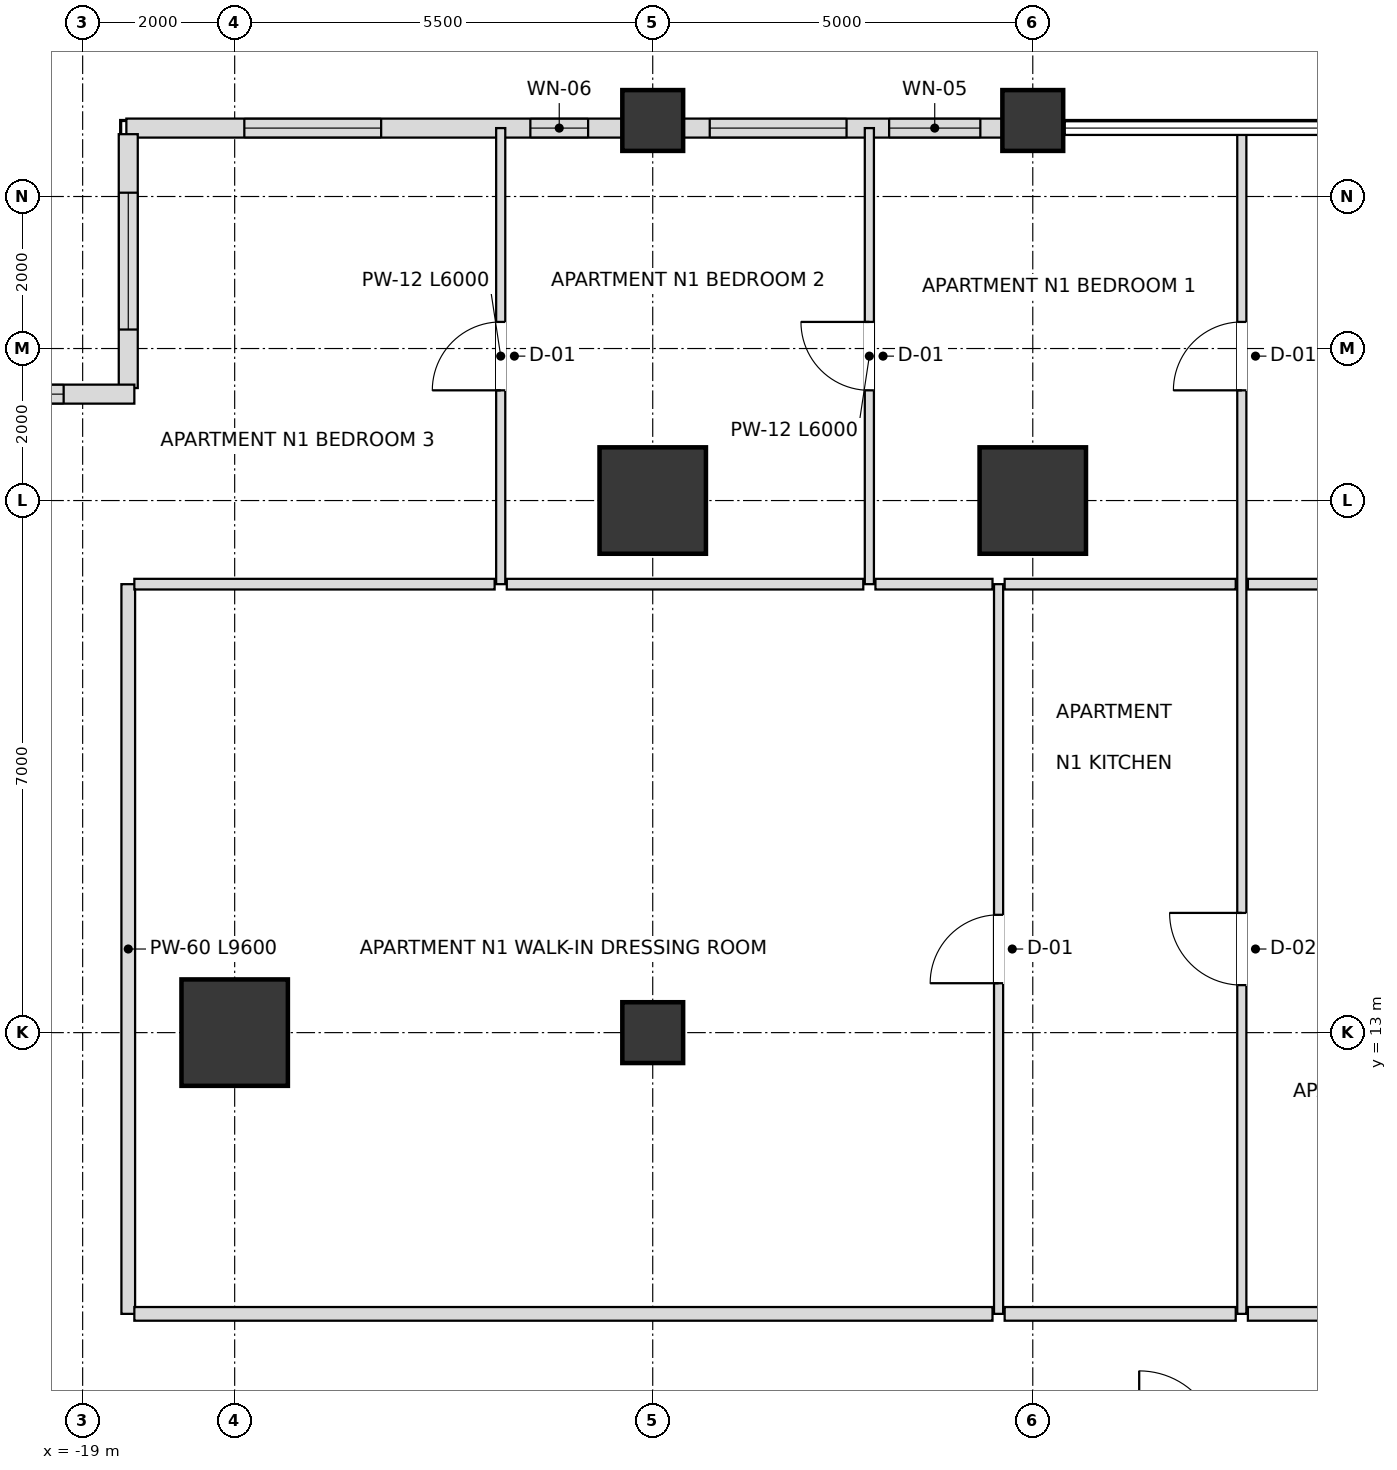
"""IFC4 building model, lengths in metres.
Left out: names, types, materials, properties, quantities, classifications, styles, units other than length and angle.
Written with IfcOpenShell. Run it as: python <this file> out.ifc"""

import sys

from ifc_helpers import new_model, si_unit, direction, frame, frame_2d, origin, origin_2d, place, context, subcontext, project, spatial, rectangle, extrude, element, fill, save


model = new_model("IFC4")
c1 = context("Model", 3, precision=1e-05, world=origin(), true_north=direction((0.0, 1.0)))
c2 = subcontext(c1, "Body", "Model", "MODEL_VIEW")
j1 = project(units=[si_unit("LENGTHUNIT", "METRE"), si_unit("PLANEANGLEUNIT", "RADIAN")], contexts=[c1])
p1 = place(None, origin())
s1 = spatial("IfcSite", under=j1, at=p1, CompositionType="ELEMENT")
p2 = place(p1, origin())
s2 = spatial("IfcBuilding", under=s1, at=p2, CompositionType="ELEMENT")
p3 = place(p2, frame((0.0, 0.0, 64.8)))
s3 = spatial("IfcBuildingStorey", under=s2, at=p3, CompositionType="ELEMENT", Elevation=64.8)
for number, where, z_axis, x_axis in (
    (1, (-6.5, 20.0, 0.0), (0.0, 0.0, 1.0), (1.0, 0.0, 0.0)),
    (2, (-11.5, 20.0, 0.0), (0.0, 0.0, 1.0), (1.0, 0.0, 0.0)),
    (3, (-17.0, 13.0, 0.0), (0.0, 0.0, 1.0), (1.0, 0.0, 0.0)),
):
    element("IfcColumn", number, at=place(p3, frame(where, z_axis=z_axis, x_axis=x_axis)), inside=s3, PredefinedType="USERDEFINED", context=c2, shape_type="SweptSolid", body=[
        extrude(rectangle(XDim=1.4, YDim=1.4, at=origin_2d()), origin(), (0.0, 0.0, 1.0), 3.6),
    ])
for number, where, z_axis, x_axis in (
    (4, (-11.5, 13.0, 0.0), (0.0, 0.0, 1.0), (1.0, 0.0, 0.0)),
    (5, (-11.5, 25.0, 0.0), (0.0, 0.0, 1.0), (1.0, 0.0, 0.0)),
    (6, (-6.5, 25.0, 0.0), (0.0, 0.0, 1.0), (1.0, 0.0, 0.0)),
):
    element("IfcColumn", number, at=place(p3, frame(where, z_axis=z_axis, x_axis=x_axis)), inside=s3, PredefinedType="COLUMN", context=c2, shape_type="SweptSolid", body=[
        extrude(rectangle(XDim=0.8, YDim=0.8, at=origin_2d()), origin(), (0.0, 0.0, 1.0), 3.6),
    ])
p4 = place(p3, frame((-6.895, 24.9, 0.0), z_axis=(0.0, 0.0, 1.0), x_axis=(-1.0, 0.0, 0.0)))
e7 = element("IfcWall", 7, at=p4, inside=s3, PredefinedType="SOLIDWALL", context=c2, shape_type="SweptSolid", body=[
    extrude(rectangle(XDim=4.21, YDim=0.25, at=frame_2d((2.105, 0.0))), origin(), (0.0, 0.0, 1.0), 2.736),
])
p5 = place(p4, frame((0.295, 0.0, 0.72)))
e8 = element("IfcOpeningElement", 8, at=p5, cuts=e7, PredefinedType="OPENING", context=c2, shape_type="SweptSolid", body=[
    extrude(rectangle(XDim=1.2, YDim=1.68, at=frame_2d((0.6, 0.84))), frame((0.0, 0.135, 0.0), z_axis=(0.0, -1.0, 0.0), x_axis=(1.0, 0.0, 0.0)), (0.0, 0.0, 1.0), 0.27),
])
p6 = place(p4, frame((2.055, 0.0, 0.72)))
e9 = element("IfcOpeningElement", 9, at=p6, cuts=e7, PredefinedType="OPENING", context=c2, shape_type="SweptSolid", body=[
    extrude(rectangle(XDim=1.8, YDim=1.68, at=frame_2d((0.9, 0.84))), frame((0.0, 0.135, 0.0), z_axis=(0.0, -1.0, 0.0), x_axis=(1.0, 0.0, 0.0)), (0.0, 0.0, 1.0), 0.27),
])
p7 = place(p3, frame((-11.895, 24.9, 0.0), z_axis=(0.0, 0.0, 1.0), x_axis=(-1.0, 0.0, 0.0)))
e10 = element("IfcWall", 10, at=p7, inside=s3, PredefinedType="SOLIDWALL", context=c2, shape_type="SweptSolid", body=[
    extrude(rectangle(XDim=6.53, YDim=0.25, at=frame_2d((3.265, 0.0))), origin(), (0.0, 0.0, 1.0), 2.736),
])
p8 = place(p7, frame((0.455, 0.0, 0.72)))
e11 = element("IfcOpeningElement", 11, at=p8, cuts=e10, PredefinedType="OPENING", context=c2, shape_type="SweptSolid", body=[
    extrude(rectangle(XDim=0.76, YDim=1.68, at=frame_2d((0.38, 0.84))), frame((0.0, 0.135, 0.0), z_axis=(0.0, -1.0, 0.0), x_axis=(1.0, 0.0, 0.0)), (0.0, 0.0, 1.0), 0.27),
])
p9 = place(p7, frame((3.178, 0.0, 0.72)))
e12 = element("IfcOpeningElement", 12, at=p9, cuts=e10, PredefinedType="OPENING", context=c2, shape_type="SweptSolid", body=[
    extrude(rectangle(XDim=1.8, YDim=1.68, at=frame_2d((0.9, 0.84))), frame((0.0, 0.135, 0.0), z_axis=(0.0, -1.0, 0.0), x_axis=(1.0, 0.0, 0.0)), (0.0, 0.0, 1.0), 0.27),
])
p10 = place(p3, frame((-18.4, 24.82, 0.0), z_axis=(0.0, 0.0, 1.0), x_axis=(0.0, -1.0, 0.0)))
e13 = element("IfcWall", 13, at=p10, inside=s3, PredefinedType="SOLIDWALL", context=c2, shape_type="SweptSolid", body=[
    extrude(rectangle(XDim=3.34, YDim=0.25, at=frame_2d((1.67, 0.0))), origin(), (0.0, 0.0, 1.0), 2.736),
])
p11 = place(p10, frame((0.77, 0.0, 0.72)))
e14 = element("IfcOpeningElement", 14, at=p11, cuts=e13, PredefinedType="OPENING", context=c2, shape_type="SweptSolid", body=[
    extrude(rectangle(XDim=1.8, YDim=1.68, at=frame_2d((0.9, 0.84))), frame((0.0, 0.135, 0.0), z_axis=(0.0, -1.0, 0.0), x_axis=(1.0, 0.0, 0.0)), (0.0, 0.0, 1.0), 0.27),
])
p12 = place(p3, frame((-18.32, 21.4, 0.0), z_axis=(0.0, 0.0, 1.0), x_axis=(-1.0, 0.0, 0.0)))
e15 = element("IfcWall", 15, at=p12, inside=s3, PredefinedType="SOLIDWALL", context=c2, shape_type="SweptSolid", body=[
    extrude(rectangle(XDim=3.66, YDim=0.25, at=frame_2d((1.83, 0.0))), origin(), (0.0, 0.0, 1.0), 2.736),
])
p13 = place(p12, frame((0.93, 0.0, 0.72)))
e16 = element("IfcOpeningElement", 16, at=p13, cuts=e15, PredefinedType="OPENING", context=c2, shape_type="SweptSolid", body=[
    extrude(rectangle(XDim=1.8, YDim=1.68, at=frame_2d((0.9, 0.84))), frame((0.0, 0.135, 0.0), z_axis=(0.0, -1.0, 0.0), x_axis=(1.0, 0.0, 0.0)), (0.0, 0.0, 1.0), 0.27),
])
p14 = place(p3, frame((-18.4, 9.3, 0.0), z_axis=(0.0, 0.0, 1.0), x_axis=(0.0, 1.0, 0.0)))
e17 = element("IfcWall", 17, at=p14, inside=s3, PredefinedType="PARTITIONING", context=c2, shape_type="SweptSolid", body=[
    extrude(rectangle(XDim=9.6, YDim=0.18, at=frame_2d((4.8, 0.0))), origin(), (0.0, 0.0, 1.0), 2.736),
])
p15 = place(p3, frame((-13.5, 18.9, 0.0), z_axis=(0.0, 0.0, 1.0), x_axis=(0.0, 1.0, 0.0)))
e18 = element("IfcWall", 18, at=p15, inside=s3, PredefinedType="PARTITIONING", context=c2, shape_type="SweptSolid", body=[
    extrude(rectangle(XDim=6.0, YDim=0.12, at=frame_2d((3.0, 0.0))), origin(), (0.0, 0.0, 1.0), 2.736),
])
p16 = place(p15, frame((2.55, 0.0, 0.0)))
e19 = element("IfcOpeningElement", 19, at=p16, cuts=e18, PredefinedType="OPENING", context=c2, shape_type="SweptSolid", body=[
    extrude(rectangle(XDim=0.9, YDim=2.1, at=frame_2d((0.45, 1.05))), frame((0.0, 0.07, 0.0), z_axis=(0.0, -1.0, 0.0), x_axis=(1.0, 0.0, 0.0)), (0.0, 0.0, 1.0), 0.14),
])
p17 = place(p3, frame((-8.65, 18.9, 0.0), z_axis=(0.0, 0.0, 1.0), x_axis=(0.0, 1.0, 0.0)))
e20 = element("IfcWall", 20, at=p17, inside=s3, PredefinedType="PARTITIONING", context=c2, shape_type="SweptSolid", body=[
    extrude(rectangle(XDim=6.0, YDim=0.12, at=frame_2d((3.0, 0.0))), origin(), (0.0, 0.0, 1.0), 2.816),
])
p18 = place(p17, frame((2.55, 0.0, 0.0)))
e21 = element("IfcOpeningElement", 21, at=p18, cuts=e20, PredefinedType="OPENING", context=c2, shape_type="SweptSolid", body=[
    extrude(rectangle(XDim=0.9, YDim=2.1, at=frame_2d((0.45, 1.05))), frame((0.0, 0.07, 0.0), z_axis=(0.0, -1.0, 0.0), x_axis=(1.0, 0.0, 0.0)), (0.0, 0.0, 1.0), 0.14),
])
p19 = place(p3, frame((-6.95, 9.3, 0.0), z_axis=(0.0, 0.0, 1.0), x_axis=(0.0, 1.0, 0.0)))
e22 = element("IfcWall", 22, at=p19, inside=s3, PredefinedType="PARTITIONING", context=c2, shape_type="SweptSolid", body=[
    extrude(rectangle(XDim=9.6, YDim=0.12, at=frame_2d((4.8, 0.0))), origin(), (0.0, 0.0, 1.0), 2.816),
])
p20 = place(p19, frame((4.35, 0.0, 0.0)))
e23 = element("IfcOpeningElement", 23, at=p20, cuts=e22, PredefinedType="OPENING", context=c2, shape_type="SweptSolid", body=[
    extrude(rectangle(XDim=0.9, YDim=2.1, at=frame_2d((0.45, 1.05))), frame((0.0, 0.07, 0.0), z_axis=(0.0, -1.0, 0.0), x_axis=(1.0, 0.0, 0.0)), (0.0, 0.0, 1.0), 0.14),
])
p21 = place(p3, frame((-3.75, 9.3, 0.0), z_axis=(0.0, 0.0, 1.0), x_axis=(0.0, 1.0, 0.0)))
e24 = element("IfcWall", 24, at=p21, inside=s3, PredefinedType="PARTITIONING", context=c2, shape_type="SweptSolid", body=[
    extrude(rectangle(XDim=15.6, YDim=0.12, at=frame_2d((7.8, 0.0))), origin(), (0.0, 0.0, 1.0), 2.816),
])
p22 = place(p21, frame((4.325, 0.0, 0.0)))
e25 = element("IfcOpeningElement", 25, at=p22, cuts=e24, PredefinedType="OPENING", context=c2, shape_type="SweptSolid", body=[
    extrude(rectangle(XDim=0.95, YDim=2.1, at=frame_2d((0.475, 1.05))), frame((0.0, 0.07, 0.0), z_axis=(0.0, -1.0, 0.0), x_axis=(1.0, 0.0, 0.0)), (0.0, 0.0, 1.0), 0.14),
])
p23 = place(p21, frame((12.15, 0.0, 0.0)))
e26 = element("IfcOpeningElement", 26, at=p23, cuts=e24, PredefinedType="OPENING", context=c2, shape_type="SweptSolid", body=[
    extrude(rectangle(XDim=0.9, YDim=2.1, at=frame_2d((0.45, 1.05))), frame((0.0, 0.07, 0.0), z_axis=(0.0, -1.0, 0.0), x_axis=(1.0, 0.0, 0.0)), (0.0, 0.0, 1.0), 0.14),
])
p24 = place(p3, frame((-18.32, 9.3, 0.0), z_axis=(0.0, 0.0, 1.0), x_axis=(1.0, 0.0, 0.0)))
e27 = element("IfcWall", 27, at=p24, inside=s3, PredefinedType="PARTITIONING", context=c2, shape_type="SweptSolid", body=[
    extrude(rectangle(XDim=11.29, YDim=0.18, at=frame_2d((5.645, 0.0))), origin(), (0.0, 0.0, 1.0), 2.816),
])
p25 = place(p3, frame((-6.87, 9.3, 0.0), z_axis=(0.0, 0.0, 1.0), x_axis=(1.0, 0.0, 0.0)))
e28 = element("IfcWall", 28, at=p25, inside=s3, PredefinedType="PARTITIONING", context=c2, shape_type="SweptSolid", body=[
    extrude(rectangle(XDim=3.04, YDim=0.18, at=frame_2d((1.52, 0.0))), origin(), (0.0, 0.0, 1.0), 2.816),
])
p26 = place(p3, frame((-3.67, 9.3, 0.0), z_axis=(0.0, 0.0, 1.0), x_axis=(1.0, 0.0, 0.0)))
e29 = element("IfcWall", 29, at=p26, inside=s3, PredefinedType="PARTITIONING", context=c2, shape_type="SweptSolid", body=[
    extrude(rectangle(XDim=4.04, YDim=0.18, at=frame_2d((2.02, 0.0))), origin(), (0.0, 0.0, 1.0), 3.38),
])
p27 = place(p26, frame((1.535, 0.0, 0.0)))
e30 = element("IfcOpeningElement", 30, at=p27, cuts=e29, PredefinedType="OPENING", context=c2, shape_type="SweptSolid", body=[
    extrude(rectangle(XDim=0.95, YDim=2.15, at=frame_2d((0.475, 1.075))), frame((0.0, 0.1, 0.0), z_axis=(0.0, -1.0, 0.0), x_axis=(1.0, 0.0, 0.0)), (0.0, 0.0, 1.0), 0.2),
])
p28 = place(p3, frame((-18.32, 18.9, 0.0), z_axis=(0.0, 0.0, 1.0), x_axis=(1.0, 0.0, 0.0)))
e31 = element("IfcWall", 31, at=p28, inside=s3, PredefinedType="PARTITIONING", context=c2, shape_type="SweptSolid", body=[
    extrude(rectangle(XDim=4.74, YDim=0.14, at=frame_2d((2.37, 0.0))), origin(), (0.0, 0.0, 1.0), 2.736),
])
p29 = place(p3, frame((-13.42, 18.9, 0.0), z_axis=(0.0, 0.0, 1.0), x_axis=(1.0, 0.0, 0.0)))
e32 = element("IfcWall", 32, at=p29, inside=s3, PredefinedType="PARTITIONING", context=c2, shape_type="SweptSolid", body=[
    extrude(rectangle(XDim=4.69, YDim=0.14, at=frame_2d((2.345, 0.0))), origin(), (0.0, 0.0, 1.0), 2.736),
])
p30 = place(p3, frame((-8.57, 18.9, 0.0), z_axis=(0.0, 0.0, 1.0), x_axis=(1.0, 0.0, 0.0)))
e33 = element("IfcWall", 33, at=p30, inside=s3, PredefinedType="PARTITIONING", context=c2, shape_type="SweptSolid", body=[
    extrude(rectangle(XDim=1.54, YDim=0.14, at=frame_2d((0.77, 0.0))), origin(), (0.0, 0.0, 1.0), 3.38),
])
p31 = place(p3, frame((-6.87, 18.9, 0.0), z_axis=(0.0, 0.0, 1.0), x_axis=(1.0, 0.0, 0.0)))
e34 = element("IfcWall", 34, at=p31, inside=s3, PredefinedType="PARTITIONING", context=c2, shape_type="SweptSolid", body=[
    extrude(rectangle(XDim=3.04, YDim=0.14, at=frame_2d((1.52, 0.0))), origin(), (0.0, 0.0, 1.0), 2.816),
])
p32 = place(p3, frame((-3.67, 18.9, 0.0), z_axis=(0.0, 0.0, 1.0), x_axis=(1.0, 0.0, 0.0)))
e35 = element("IfcWall", 35, at=p32, inside=s3, PredefinedType="PARTITIONING", context=c2, shape_type="SweptSolid", body=[
    extrude(rectangle(XDim=4.04, YDim=0.14, at=frame_2d((2.02, 0.0))), origin(), (0.0, 0.0, 1.0), 3.38),
])
p33 = place(p32, frame((1.535, 0.0, 0.0)))
e36 = element("IfcOpeningElement", 36, at=p33, cuts=e35, PredefinedType="OPENING", context=c2, shape_type="SweptSolid", body=[
    extrude(rectangle(XDim=0.95, YDim=2.1, at=frame_2d((0.475, 1.05))), frame((0.0, 0.08, 0.0), z_axis=(0.0, -1.0, 0.0), x_axis=(1.0, 0.0, 0.0)), (0.0, 0.0, 1.0), 0.16),
])
p34 = place(p5, origin())
e37 = element("IfcWindow", 37, at=p34, inside=s3, PartitioningType="SINGLE_PANEL", PredefinedType="WINDOW", context=c2, shape_type="SweptSolid", body=[
    extrude(rectangle(XDim=1.2, YDim=1.68, at=frame_2d((0.6, 0.84))), frame((0.0, 0.03, 0.0), z_axis=(0.0, -1.0, 0.0), x_axis=(1.0, 0.0, 0.0)), (0.0, 0.0, 1.0), 0.06),
])
fill(e8, e37)
p35 = place(p6, origin())
e38 = element("IfcWindow", 38, at=p35, inside=s3, PartitioningType="SINGLE_PANEL", PredefinedType="WINDOW", context=c2, shape_type="SweptSolid", body=[
    extrude(rectangle(XDim=1.8, YDim=1.68, at=frame_2d((0.9, 0.84))), frame((0.0, 0.03, 0.0), z_axis=(0.0, -1.0, 0.0), x_axis=(1.0, 0.0, 0.0)), (0.0, 0.0, 1.0), 0.06),
])
fill(e9, e38)
p36 = place(p8, origin())
e39 = element("IfcWindow", 39, at=p36, inside=s3, PartitioningType="SINGLE_PANEL", PredefinedType="WINDOW", context=c2, shape_type="SweptSolid", body=[
    extrude(rectangle(XDim=0.76, YDim=1.68, at=frame_2d((0.38, 0.84))), frame((0.0, 0.03, 0.0), z_axis=(0.0, -1.0, 0.0), x_axis=(1.0, 0.0, 0.0)), (0.0, 0.0, 1.0), 0.06),
])
fill(e11, e39)
p37 = place(p9, origin())
e40 = element("IfcWindow", 40, at=p37, inside=s3, PartitioningType="SINGLE_PANEL", PredefinedType="WINDOW", context=c2, shape_type="SweptSolid", body=[
    extrude(rectangle(XDim=1.8, YDim=1.68, at=frame_2d((0.9, 0.84))), frame((0.0, 0.03, 0.0), z_axis=(0.0, -1.0, 0.0), x_axis=(1.0, 0.0, 0.0)), (0.0, 0.0, 1.0), 0.06),
])
fill(e12, e40)
p38 = place(p11, origin())
e41 = element("IfcWindow", 41, at=p38, inside=s3, PartitioningType="SINGLE_PANEL", PredefinedType="WINDOW", context=c2, shape_type="SweptSolid", body=[
    extrude(rectangle(XDim=1.8, YDim=1.68, at=frame_2d((0.9, 0.84))), frame((0.0, 0.03, 0.0), z_axis=(0.0, -1.0, 0.0), x_axis=(1.0, 0.0, 0.0)), (0.0, 0.0, 1.0), 0.06),
])
fill(e14, e41)
p39 = place(p13, origin())
e42 = element("IfcWindow", 42, at=p39, inside=s3, PartitioningType="SINGLE_PANEL", PredefinedType="WINDOW", context=c2, shape_type="SweptSolid", body=[
    extrude(rectangle(XDim=1.8, YDim=1.68, at=frame_2d((0.9, 0.84))), frame((0.0, 0.03, 0.0), z_axis=(0.0, -1.0, 0.0), x_axis=(1.0, 0.0, 0.0)), (0.0, 0.0, 1.0), 0.06),
])
fill(e16, e42)
p40 = place(p22, origin())
e43 = element("IfcDoor", 43, at=p40, inside=s3, OperationType="SINGLE_SWING_RIGHT", PredefinedType="DOOR", context=c2, shape_type="SweptSolid", body=[
    extrude(rectangle(XDim=0.95, YDim=2.1, at=frame_2d((0.475, 1.05))), frame((0.0, 0.025, 0.0), z_axis=(0.0, -1.0, 0.0), x_axis=(1.0, 0.0, 0.0)), (0.0, 0.0, 1.0), 0.05),
])
fill(e25, e43)
p41 = place(p20, origin())
e44 = element("IfcDoor", 44, at=p41, inside=s3, OperationType="SINGLE_SWING_LEFT", PredefinedType="DOOR", context=c2, shape_type="SweptSolid", body=[
    extrude(rectangle(XDim=0.9, YDim=2.1, at=frame_2d((0.45, 1.05))), frame((0.0, 0.025, 0.0), z_axis=(0.0, -1.0, 0.0), x_axis=(1.0, 0.0, 0.0)), (0.0, 0.0, 1.0), 0.05),
])
fill(e23, e44)
p42 = place(p23, origin())
e45 = element("IfcDoor", 45, at=p42, inside=s3, OperationType="SINGLE_SWING_LEFT", PredefinedType="DOOR", context=c2, shape_type="SweptSolid", body=[
    extrude(rectangle(XDim=0.9, YDim=2.1, at=frame_2d((0.45, 1.05))), frame((0.0, 0.025, 0.0), z_axis=(0.0, -1.0, 0.0), x_axis=(1.0, 0.0, 0.0)), (0.0, 0.0, 1.0), 0.05),
])
fill(e26, e45)
p43 = place(p18, origin())
e46 = element("IfcDoor", 46, at=p43, inside=s3, OperationType="SINGLE_SWING_RIGHT", PredefinedType="DOOR", context=c2, shape_type="SweptSolid", body=[
    extrude(rectangle(XDim=0.9, YDim=2.1, at=frame_2d((0.45, 1.05))), frame((0.0, 0.025, 0.0), z_axis=(0.0, -1.0, 0.0), x_axis=(1.0, 0.0, 0.0)), (0.0, 0.0, 1.0), 0.05),
])
fill(e21, e46)
p44 = place(p16, origin())
e47 = element("IfcDoor", 47, at=p44, inside=s3, OperationType="SINGLE_SWING_LEFT", PredefinedType="DOOR", context=c2, shape_type="SweptSolid", body=[
    extrude(rectangle(XDim=0.9, YDim=2.1, at=frame_2d((0.45, 1.05))), frame((0.0, 0.025, 0.0), z_axis=(0.0, -1.0, 0.0), x_axis=(1.0, 0.0, 0.0)), (0.0, 0.0, 1.0), 0.05),
])
fill(e19, e47)
save(model, sys.argv[1])
